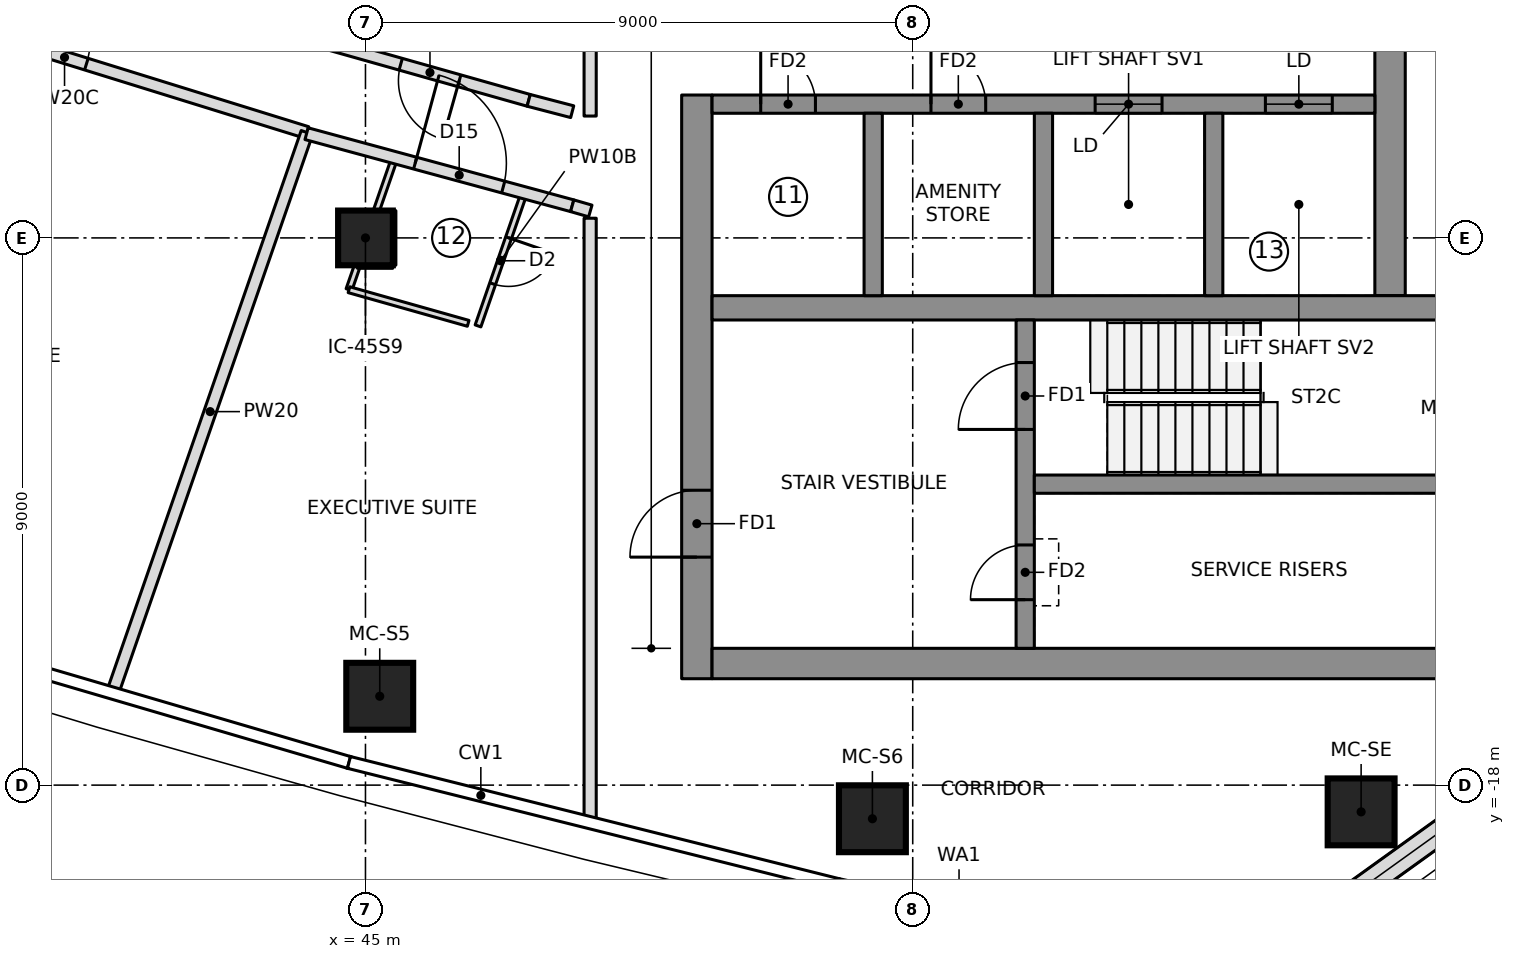
"""IFC4 building model, lengths in metres.
Left out: names, types, materials, properties, quantities, classifications, styles, units other than length and angle.
Written with IfcOpenShell. Run it as: python <this file> out.ifc"""

import sys

from ifc_helpers import new_model, si_unit, direction, frame, frame_2d, origin, origin_2d, place, context, subcontext, project, spatial, polyline, rectangle, outline, extrude, element, fill, save


model = new_model("IFC4")
c1 = context("Model", 3, precision=1e-05, world=origin(), true_north=direction((0.0, 1.0)))
c2 = subcontext(c1, "Body", "Model", "MODEL_VIEW")
j1 = project(units=[si_unit("LENGTHUNIT", "METRE"), si_unit("PLANEANGLEUNIT", "RADIAN")], contexts=[c1])
p1 = place(None, origin())
s1 = spatial("IfcSite", under=j1, at=p1, CompositionType="ELEMENT")
p2 = place(p1, origin())
s2 = spatial("IfcBuilding", under=s1, at=p2, CompositionType="ELEMENT")
p3 = place(p2, frame((0.0, 0.0, 292.75)))
s3 = spatial("IfcBuildingStorey", under=s2, at=p3, CompositionType="ELEMENT", Elevation=292.75)
p4 = place(p3, frame((50.45, -16.25, 0.0), z_axis=(0.0, 0.0, 1.0), x_axis=(0.0, 1.0, 0.0)))
e1 = element("IfcWall", 1, at=p4, inside=s3, PredefinedType="SHEAR", context=c2, shape_type="SweptSolid", body=[
    extrude(rectangle(XDim=9.6, YDim=0.5, at=frame_2d((4.8, 0.0))), origin(), (0.0, 0.0, 1.0), 3.55),
])
p5 = place(p4, frame((2.0, 0.0, 0.0)))
e2 = element("IfcOpeningElement", 2, at=p5, cuts=e1, PredefinedType="OPENING", context=c2, shape_type="SweptSolid", body=[
    extrude(rectangle(XDim=1.1, YDim=2.1, at=frame_2d((0.55, 1.05))), frame((0.0, 0.26, 0.0), z_axis=(0.0, -1.0, 0.0), x_axis=(1.0, 0.0, 0.0)), (0.0, 0.0, 1.0), 0.52),
])
p6 = place(p3, frame((50.7, -16.0, 0.0), z_axis=(0.0, 0.0, 1.0), x_axis=(1.0, 0.0, 0.0)))
e3 = element("IfcWall", 3, at=p6, inside=s3, PredefinedType="SHEAR", context=c2, shape_type="SweptSolid", body=[
    extrude(rectangle(XDim=13.52, YDim=0.5, at=frame_2d((6.76, 0.0))), origin(), (0.0, 0.0, 1.0), 3.55),
])
p7 = place(p3, frame((61.85, -9.95, 0.0), z_axis=(0.0, 0.0, 1.0), x_axis=(0.0, 1.0, 0.0)))
e4 = element("IfcWall", 4, at=p7, inside=s3, PredefinedType="SHEAR", context=c2, shape_type="SweptSolid", body=[
    extrude(rectangle(XDim=19.9, YDim=0.5, at=frame_2d((9.95, 0.0))), origin(), (0.0, 0.0, 1.0), 3.55),
])
p8 = place(p3, frame((50.7, -10.15, 0.0), z_axis=(0.0, 0.0, 1.0), x_axis=(1.0, 0.0, 0.0)))
e5 = element("IfcWall", 5, at=p8, inside=s3, PredefinedType="SHEAR", context=c2, shape_type="SweptSolid", body=[
    extrude(rectangle(XDim=13.02, YDim=0.4, at=frame_2d((6.51, 0.0))), origin(), (0.0, 0.0, 1.0), 3.55),
])
p9 = place(p3, frame((50.7, -6.8, 0.0), z_axis=(0.0, 0.0, 1.0), x_axis=(1.0, 0.0, 0.0)))
e6 = element("IfcWall", 6, at=p9, inside=s3, PredefinedType="SHEAR", context=c2, shape_type="SweptSolid", body=[
    extrude(rectangle(XDim=10.9, YDim=0.3, at=frame_2d((5.45, 0.0))), origin(), (0.0, 0.0, 1.0), 3.55),
])
p10 = place(p9, frame((6.3, 0.0, 0.0)))
e7 = element("IfcOpeningElement", 7, at=p10, cuts=e6, PredefinedType="OPENING", context=c2, shape_type="SweptSolid", body=[
    extrude(rectangle(XDim=1.1, YDim=2.1, at=frame_2d((0.55, 1.05))), frame((0.0, 0.16, 0.0), z_axis=(0.0, -1.0, 0.0), x_axis=(1.0, 0.0, 0.0)), (0.0, 0.0, 1.0), 0.32),
])
p11 = place(p9, frame((9.1, 0.0, 0.0)))
e8 = element("IfcOpeningElement", 8, at=p11, cuts=e6, PredefinedType="OPENING", context=c2, shape_type="SweptSolid", body=[
    extrude(rectangle(XDim=1.1, YDim=2.1, at=frame_2d((0.55, 1.05))), frame((0.0, 0.16, 0.0), z_axis=(0.0, -1.0, 0.0), x_axis=(1.0, 0.0, 0.0)), (0.0, 0.0, 1.0), 0.32),
])
p12 = place(p9, frame((0.8, 0.0, 0.0)))
e9 = element("IfcOpeningElement", 9, at=p12, cuts=e6, PredefinedType="OPENING", context=c2, shape_type="SweptSolid", body=[
    extrude(rectangle(XDim=0.9, YDim=2.1, at=frame_2d((0.45, 1.05))), frame((0.0, 0.16, 0.0), z_axis=(0.0, -1.0, 0.0), x_axis=(1.0, 0.0, 0.0)), (0.0, 0.0, 1.0), 0.32),
])
p13 = place(p9, frame((3.6, 0.0, 0.0)))
e10 = element("IfcOpeningElement", 10, at=p13, cuts=e6, PredefinedType="OPENING", context=c2, shape_type="SweptSolid", body=[
    extrude(rectangle(XDim=0.9, YDim=2.1, at=frame_2d((0.45, 1.05))), frame((0.0, 0.16, 0.0), z_axis=(0.0, -1.0, 0.0), x_axis=(1.0, 0.0, 0.0)), (0.0, 0.0, 1.0), 0.32),
])
for number, where, z_axis, x_axis in (
    (11, (53.35, -9.95, 0.0), (0.0, 0.0, 1.0), (0.0, 1.0, 0.0)),
    (12, (56.15, -9.95, 0.0), (0.0, 0.0, 1.0), (0.0, 1.0, 0.0)),
    (13, (58.95, -9.95, 0.0), (0.0, 0.0, 1.0), (0.0, 1.0, 0.0)),
):
    element("IfcWall", number, at=place(p3, frame(where, z_axis=z_axis, x_axis=x_axis)), inside=s3, PredefinedType="SHEAR", context=c2, shape_type="SweptSolid", body=[
        extrude(rectangle(XDim=3.0, YDim=0.3, at=frame_2d((1.5, 0.0))), origin(), (0.0, 0.0, 1.0), 3.55),
    ])
p14 = place(p3, frame((55.85, -15.75, 0.0), z_axis=(0.0, 0.0, 1.0), x_axis=(0.0, 1.0, 0.0)))
e14 = element("IfcWall", 14, at=p14, inside=s3, PredefinedType="SHEAR", context=c2, shape_type="SweptSolid", body=[
    extrude(rectangle(XDim=5.4, YDim=0.3, at=frame_2d((2.7, 0.0))), origin(), (0.0, 0.0, 1.0), 3.55),
])
p15 = place(p14, frame((3.6, 0.0, 0.0)))
e15 = element("IfcOpeningElement", 15, at=p15, cuts=e14, PredefinedType="OPENING", context=c2, shape_type="SweptSolid", body=[
    extrude(rectangle(XDim=1.1, YDim=2.1, at=frame_2d((0.55, 1.05))), frame((0.0, 0.16, 0.0), z_axis=(0.0, -1.0, 0.0), x_axis=(1.0, 0.0, 0.0)), (0.0, 0.0, 1.0), 0.32),
])
p16 = place(p14, frame((0.8, 0.0, 0.0)))
e16 = element("IfcOpeningElement", 16, at=p16, cuts=e14, PredefinedType="OPENING", context=c2, shape_type="SweptSolid", body=[
    extrude(rectangle(XDim=0.9, YDim=2.1, at=frame_2d((0.45, 1.05))), frame((0.0, 0.16, 0.0), z_axis=(0.0, -1.0, 0.0), x_axis=(1.0, 0.0, 0.0)), (0.0, 0.0, 1.0), 0.32),
])
p17 = place(p3, frame((56.0, -13.05, 0.0), z_axis=(0.0, 0.0, 1.0), x_axis=(1.0, 0.0, 0.0)))
e17 = element("IfcWall", 17, at=p17, inside=s3, PredefinedType="SHEAR", context=c2, shape_type="SweptSolid", body=[
    extrude(rectangle(XDim=7.72, YDim=0.3, at=frame_2d((3.86, 0.0))), origin(), (0.0, 0.0, 1.0), 3.55),
])
for number, where, z_axis, x_axis in (
    (18, (45.235, -16.539, 0.0), (0.0, 0.0, 1.0), (1.0, 0.0, 0.0)),
    (19, (53.337, -18.553, 0.0), (0.0, 0.0, 1.0), (1.0, 0.0, 0.0)),
    (20, (61.374, -18.44, 0.0), (0.0, 0.0, 1.0), (1.0, 0.0, 0.0)),
):
    element("IfcColumn", number, at=place(p3, frame(where, z_axis=z_axis, x_axis=x_axis)), inside=s3, PredefinedType="COLUMN", context=c2, shape_type="SweptSolid", body=[
        extrude(rectangle(XDim=1.1, YDim=1.1, at=origin_2d()), origin(), (0.0, 0.0, 1.0), 3.55),
    ])
p18 = place(p3, frame((45.0, -9.0, 0.0), z_axis=(0.0, 0.0, 1.0), x_axis=(1.0, 0.0, 0.0)))
e21 = element("IfcColumn", 21, at=p18, inside=s3, PredefinedType="COLUMN", context=c2, shape_type="SweptSolid", body=[
    extrude(rectangle(XDim=0.9, YDim=0.9, at=origin_2d()), origin(), (0.0, 0.0, 1.0), 3.55),
])
p19 = place(p3, frame((52.738, -19.732, 0.0), z_axis=(0.0, 0.0, 1.0), x_axis=(0.977020225348, -0.213146614471, 0.0)))
e22 = element("IfcWall", 22, at=p19, inside=s3, PredefinedType="NOTDEFINED", context=c2, shape_type="SweptSolid", body=[
    extrude(outline(polyline([(0.0, -0.2), (4.171, -0.2), (4.113, 0.2), (0.0, 0.2), (0.0, -0.2)])), origin(), (0.0, 0.0, 1.0), 3.25),
])
p20 = place(p19, frame((0.871, 0.0, 0.5)))
e23 = element("IfcOpeningElement", 23, at=p20, cuts=e22, PredefinedType="OPENING", context=c2, shape_type="SweptSolid", body=[
    extrude(rectangle(XDim=2.4, YDim=2.0, at=frame_2d((1.2, 1.0))), frame((0.0, 0.21, 0.0), z_axis=(0.0, -1.0, 0.0), x_axis=(1.0, 0.0, 0.0)), (0.0, 0.0, 1.0), 0.42),
])
p21 = place(p3, frame((60.472, -20.352, 0.0), z_axis=(0.0, 0.0, 1.0), x_axis=(0.811962548682, 0.583709533533, 0.0)))
e24 = element("IfcWall", 24, at=p21, inside=s3, PredefinedType="NOTDEFINED", context=c2, shape_type="SweptSolid", body=[
    extrude(outline(polyline([(-0.057, -0.2), (3.753, -0.2), (3.64, 0.2), (0.057, 0.2), (-0.057, -0.2)])), origin(), (0.0, 0.0, 1.0), 3.25),
])
p22 = place(p21, frame((0.748, 0.0, 0.6)))
e25 = element("IfcOpeningElement", 25, at=p22, cuts=e24, PredefinedType="OPENING", context=c2, shape_type="SweptSolid", body=[
    extrude(outline(polyline([(0.0, 1.35), (0.084, 1.771), (0.322, 2.128), (0.679, 2.366), (1.1, 2.45), (1.521, 2.366), (1.878, 2.128), (2.116, 1.771), (2.2, 1.35), (2.2, 1.1), (2.116, 0.679), (1.878, 0.322), (1.521, 0.084), (1.1, 0.0), (0.679, 0.084), (0.322, 0.322), (0.084, 0.679), (0.0, 1.1), (0.0, 1.35)])), frame((0.0, 0.21, 0.0), z_axis=(0.0, -1.0, 0.0), x_axis=(1.0, 0.0, 0.0)), (0.0, 0.0, 1.0), 0.42),
])
p23 = place(p3, frame((36.064, -4.794, 0.0), z_axis=(0.0, 0.0, 1.0), x_axis=(0.955129200503, -0.296189483855, 0.0)))
e26 = element("IfcWall", 26, at=p23, inside=s3, PredefinedType="PARTITIONING", context=c2, shape_type="SweptSolid", body=[
    extrude(rectangle(XDim=8.348, YDim=0.2, at=frame_2d((4.174, 0.0))), origin(), (0.0, 0.0, 1.0), 3.25),
])
p24 = place(p23, frame((3.05, 0.0, 0.0)))
e27 = element("IfcOpeningElement", 27, at=p24, cuts=e26, PredefinedType="OPENING", context=c2, shape_type="SweptSolid", body=[
    extrude(rectangle(XDim=1.5, YDim=2.1, at=frame_2d((0.75, 1.05))), frame((0.0, 0.11, 0.0), z_axis=(0.0, -1.0, 0.0), x_axis=(1.0, 0.0, 0.0)), (0.0, 0.0, 1.0), 0.22),
])
p25 = place(p3, frame((40.854, -16.447, 0.0), z_axis=(0.0, 0.0, 1.0), x_axis=(0.327714576096, 0.944776776077, 0.0)))
e28 = element("IfcWall", 28, at=p25, inside=s3, PredefinedType="PARTITIONING", context=c2, shape_type="SweptSolid", body=[
    extrude(rectangle(XDim=9.717, YDim=0.2, at=frame_2d((4.858, 0.0))), origin(), (0.0, 0.0, 1.0), 3.25),
])
p26 = place(p3, frame((44.729, -9.852, 0.0), z_axis=(0.0, 0.0, 1.0), x_axis=(0.327741335839, 0.944767493504, 0.0)))
e29 = element("IfcWall", 29, at=p26, inside=s3, PredefinedType="PARTITIONING", context=c2, shape_type="SweptSolid", body=[
    extrude(rectangle(XDim=0.425, YDim=0.1, at=frame_2d((0.213, 0.0))), origin(), (0.0, 0.0, 1.0), 3.25),
])
p27 = place(p3, frame((44.868, -9.45, 0.0), z_axis=(0.0, 0.0, 1.0), x_axis=(1.0, 0.0, 0.0)))
e30 = element("IfcWall", 30, at=p27, inside=s3, PredefinedType="PARTITIONING", context=c2, shape_type="SweptSolid", body=[
    extrude(rectangle(XDim=0.58, YDim=0.1, at=frame_2d((0.29, 0.0))), origin(), (0.0, 0.0, 1.0), 3.25),
])
p28 = place(p3, frame((45.45, -9.448, 0.0), z_axis=(0.0, 0.0, 1.0), x_axis=(0.0, 1.0, 0.0)))
e31 = element("IfcWall", 31, at=p28, inside=s3, PredefinedType="PARTITIONING", context=c2, shape_type="SweptSolid", body=[
    extrude(rectangle(XDim=0.896, YDim=0.1, at=frame_2d((0.448, 0.0))), origin(), (0.0, 0.0, 1.0), 3.25),
])
p29 = place(p3, frame((45.18, -8.55, 0.0), z_axis=(0.0, 0.0, 1.0), x_axis=(0.327723446833, 0.944773699039, 0.0)))
e32 = element("IfcWall", 32, at=p29, inside=s3, PredefinedType="PARTITIONING", context=c2, shape_type="SweptSolid", body=[
    extrude(rectangle(XDim=0.903, YDim=0.1, at=frame_2d((0.451, 0.0))), origin(), (0.0, 0.0, 1.0), 3.25),
])
p30 = place(p3, frame((47.599, -8.289, 0.0), z_axis=(0.0, 0.0, 1.0), x_axis=(-0.327716238033, -0.944776199599, 0.0)))
e33 = element("IfcWall", 33, at=p30, inside=s3, PredefinedType="PARTITIONING", context=c2, shape_type="SweptSolid", body=[
    extrude(rectangle(XDim=2.284, YDim=0.1, at=frame_2d((1.142, 0.0))), origin(), (0.0, 0.0, 1.0), 3.25),
])
p31 = place(p30, frame((0.75, 0.0, 0.0)))
e34 = element("IfcOpeningElement", 34, at=p31, cuts=e33, PredefinedType="OPENING", context=c2, shape_type="SweptSolid", body=[
    extrude(rectangle(XDim=0.8, YDim=2.1, at=frame_2d((0.4, 1.05))), frame((0.0, 0.06, 0.0), z_axis=(0.0, -1.0, 0.0), x_axis=(1.0, 0.0, 0.0)), (0.0, 0.0, 1.0), 0.12),
])
p32 = place(p3, frame((46.689, -10.405, 0.0), z_axis=(0.0, 0.0, 1.0), x_axis=(-0.962405498185, 0.271616746654, 0.0)))
e35 = element("IfcWall", 35, at=p32, inside=s3, PredefinedType="PARTITIONING", context=c2, shape_type="SweptSolid", body=[
    extrude(rectangle(XDim=2.037, YDim=0.1, at=frame_2d((1.019, 0.0))), origin(), (0.0, 0.0, 1.0), 3.25),
])
p33 = place(p3, frame((47.684, -6.738, 0.0), z_axis=(0.0, 0.0, 1.0), x_axis=(-0.962403613575, 0.271623424206, 0.0)))
e36 = element("IfcWall", 36, at=p33, inside=s3, PredefinedType="PARTITIONING", context=c2, shape_type="SweptSolid", body=[
    extrude(rectangle(XDim=3.374, YDim=0.2, at=frame_2d((1.687, 0.0))), origin(), (0.0, 0.0, 1.0), 3.25),
])
p34 = place(p33, frame((1.187, 0.0, 0.0)))
e37 = element("IfcOpeningElement", 37, at=p34, cuts=e36, PredefinedType="OPENING", context=c2, shape_type="SweptSolid", body=[
    extrude(rectangle(XDim=1.0, YDim=2.1, at=frame_2d((0.5, 1.05))), frame((0.0, 0.11, 0.0), z_axis=(0.0, -1.0, 0.0), x_axis=(1.0, 0.0, 0.0)), (0.0, 0.0, 1.0), 0.22),
])
p35 = place(p3, frame((44.031, -7.286, 0.0), z_axis=(0.0, 0.0, 1.0), x_axis=(0.965107760304, -0.261853033211, 0.0)))
e38 = element("IfcWall", 38, at=p35, inside=s3, PredefinedType="PARTITIONING", context=c2, shape_type="SweptSolid", body=[
    extrude(rectangle(XDim=4.527, YDim=0.2, at=frame_2d((2.263, 0.0))), origin(), (0.0, 0.0, 1.0), 3.25),
])
p36 = place(p35, frame((1.851, 0.0, 0.0)))
e39 = element("IfcOpeningElement", 39, at=p36, cuts=e38, PredefinedType="OPENING", context=c2, shape_type="SweptSolid", body=[
    extrude(rectangle(XDim=1.5, YDim=2.1, at=frame_2d((0.75, 1.05))), frame((0.0, 0.11, 0.0), z_axis=(0.0, -1.0, 0.0), x_axis=(1.0, 0.0, 0.0)), (0.0, 0.0, 1.0), 0.22),
])
p37 = place(p3, frame((48.4, -6.924, 0.0), z_axis=(0.0, 0.0, 1.0), x_axis=(-0.967585713416, 0.252542842294, 0.0)))
e40 = element("IfcWall", 40, at=p37, inside=s3, PredefinedType="PARTITIONING", context=c2, shape_type="SweptSolid", body=[
    extrude(rectangle(XDim=0.74, YDim=0.2, at=frame_2d((0.37, 0.0))), origin(), (0.0, 0.0, 1.0), 3.25),
])
p38 = place(p3, frame((48.695, 6.996, 0.0), z_axis=(0.0, 0.0, 1.0), x_axis=(0.0, -1.0, 0.0)))
e41 = element("IfcWall", 41, at=p38, inside=s3, PredefinedType="PARTITIONING", context=c2, shape_type="SweptSolid", body=[
    extrude(rectangle(XDim=13.992, YDim=0.2, at=frame_2d((6.996, 0.0))), origin(), (0.0, 0.0, 1.0), 3.25),
])
p39 = place(p3, frame((48.4, -8.471, 0.0), z_axis=(0.0, 0.0, 1.0), x_axis=(0.960807456803, -0.277216577701, 0.0)))
e42 = element("IfcWall", 42, at=p39, inside=s3, PredefinedType="PARTITIONING", context=c2, shape_type="SweptSolid", body=[
    extrude(rectangle(XDim=0.31, YDim=0.2, at=frame_2d((0.155, 0.0))), origin(), (0.0, 0.0, 1.0), 3.25),
])
p40 = place(p3, frame((48.695, -8.676, 0.0), z_axis=(0.0, 0.0, 1.0), x_axis=(0.0, -1.0, 0.0)))
e43 = element("IfcWall", 43, at=p40, inside=s3, PredefinedType="PARTITIONING", context=c2, shape_type="SweptSolid", body=[
    extrude(rectangle(XDim=9.877, YDim=0.2, at=frame_2d((4.938, 0.0))), origin(), (0.0, 0.0, 1.0), 3.25),
])
p41 = place(p22, origin())
e44 = element("IfcWindow", 44, at=p41, inside=s3, PartitioningType="SINGLE_PANEL", PredefinedType="WINDOW", context=c2, shape_type="SweptSolid", body=[
    extrude(outline(polyline([(0.0, 1.35), (0.084, 1.771), (0.322, 2.128), (0.679, 2.366), (1.1, 2.45), (1.521, 2.366), (1.878, 2.128), (2.116, 1.771), (2.2, 1.35), (2.2, 1.1), (2.116, 0.679), (1.878, 0.322), (1.521, 0.084), (1.1, 0.0), (0.679, 0.084), (0.322, 0.322), (0.084, 0.679), (0.0, 1.1), (0.0, 1.35)])), frame((0.0, 0.17, 0.0), z_axis=(0.0, -1.0, 0.0), x_axis=(1.0, 0.0, 0.0)), (0.0, 0.0, 1.0), 0.06),
])
fill(e25, e44)
p42 = place(p24, origin())
e45 = element("IfcDoor", 45, at=p42, inside=s3, OperationType="DOUBLE_DOOR_SINGLE_SWING", PredefinedType="DOOR", context=c2, shape_type="SweptSolid", body=[
    extrude(rectangle(XDim=1.5, YDim=2.1, at=frame_2d((0.75, 1.05))), frame((0.0, 0.025, 0.0), z_axis=(0.0, -1.0, 0.0), x_axis=(1.0, 0.0, 0.0)), (0.0, 0.0, 1.0), 0.05),
])
fill(e27, e45)
p43 = place(p31, origin())
e46 = element("IfcDoor", 46, at=p43, inside=s3, OperationType="SINGLE_SWING_LEFT", PredefinedType="DOOR", context=c2, shape_type="SweptSolid", body=[
    extrude(rectangle(XDim=0.8, YDim=2.1, at=frame_2d((0.4, 1.05))), frame((0.0, 0.025, 0.0), z_axis=(0.0, -1.0, 0.0), x_axis=(1.0, 0.0, 0.0)), (0.0, 0.0, 1.0), 0.05),
])
fill(e34, e46)
p44 = place(p36, origin())
e47 = element("IfcDoor", 47, at=p44, inside=s3, OperationType="DOUBLE_DOOR_SINGLE_SWING", PredefinedType="DOOR", context=c2, shape_type="SweptSolid", body=[
    extrude(rectangle(XDim=1.5, YDim=2.1, at=frame_2d((0.75, 1.05))), frame((0.0, 0.025, 0.0), z_axis=(0.0, -1.0, 0.0), x_axis=(1.0, 0.0, 0.0)), (0.0, 0.0, 1.0), 0.05),
])
fill(e39, e47)
p45 = place(p34, origin())
e48 = element("IfcDoor", 48, at=p45, inside=s3, OperationType="SINGLE_SWING_LEFT", PredefinedType="DOOR", context=c2, shape_type="SweptSolid", body=[
    extrude(rectangle(XDim=1.0, YDim=2.1, at=frame_2d((0.5, 1.05))), frame((0.0, 0.025, 0.0), z_axis=(0.0, -1.0, 0.0), x_axis=(1.0, 0.0, 0.0)), (0.0, 0.0, 1.0), 0.05),
])
fill(e37, e48)
p46 = place(p10, origin())
e49 = element("IfcDoor", 49, at=p46, inside=s3, OperationType="DOUBLE_DOOR_SLIDING", PredefinedType="DOOR", context=c2, shape_type="SweptSolid", body=[
    extrude(rectangle(XDim=1.1, YDim=2.1, at=frame_2d((0.55, 1.05))), frame((0.0, 0.025, 0.0), z_axis=(0.0, -1.0, 0.0), x_axis=(1.0, 0.0, 0.0)), (0.0, 0.0, 1.0), 0.05),
])
fill(e7, e49)
p47 = place(p11, origin())
e50 = element("IfcDoor", 50, at=p47, inside=s3, OperationType="DOUBLE_DOOR_SLIDING", PredefinedType="DOOR", context=c2, shape_type="SweptSolid", body=[
    extrude(rectangle(XDim=1.1, YDim=2.1, at=frame_2d((0.55, 1.05))), frame((0.0, 0.025, 0.0), z_axis=(0.0, -1.0, 0.0), x_axis=(1.0, 0.0, 0.0)), (0.0, 0.0, 1.0), 0.05),
])
fill(e8, e50)
p48 = place(p15, origin())
e51 = element("IfcDoor", 51, at=p48, inside=s3, OperationType="SINGLE_SWING_RIGHT", PredefinedType="DOOR", context=c2, shape_type="SweptSolid", body=[
    extrude(rectangle(XDim=1.1, YDim=2.1, at=frame_2d((0.55, 1.05))), frame((0.0, 0.025, 0.0), z_axis=(0.0, -1.0, 0.0), x_axis=(1.0, 0.0, 0.0)), (0.0, 0.0, 1.0), 0.05),
])
fill(e15, e51)
p49 = place(p5, origin())
e52 = element("IfcDoor", 52, at=p49, inside=s3, OperationType="SINGLE_SWING_RIGHT", PredefinedType="DOOR", context=c2, shape_type="SweptSolid", body=[
    extrude(rectangle(XDim=1.1, YDim=2.1, at=frame_2d((0.55, 1.05))), frame((0.0, 0.025, 0.0), z_axis=(0.0, -1.0, 0.0), x_axis=(1.0, 0.0, 0.0)), (0.0, 0.0, 1.0), 0.05),
])
fill(e2, e52)
p50 = place(p16, origin())
e53 = element("IfcDoor", 53, at=p50, inside=s3, OperationType="SINGLE_SWING_LEFT", PredefinedType="DOOR", context=c2, shape_type="SweptSolid", body=[
    extrude(rectangle(XDim=0.9, YDim=2.1, at=frame_2d((0.45, 1.05))), frame((0.0, 0.025, 0.0), z_axis=(0.0, -1.0, 0.0), x_axis=(1.0, 0.0, 0.0)), (0.0, 0.0, 1.0), 0.05),
])
fill(e16, e53)
p51 = place(p12, origin())
e54 = element("IfcDoor", 54, at=p51, inside=s3, OperationType="SINGLE_SWING_LEFT", PredefinedType="DOOR", context=c2, shape_type="SweptSolid", body=[
    extrude(rectangle(XDim=0.9, YDim=2.1, at=frame_2d((0.45, 1.05))), frame((0.0, 0.025, 0.0), z_axis=(0.0, -1.0, 0.0), x_axis=(1.0, 0.0, 0.0)), (0.0, 0.0, 1.0), 0.05),
])
fill(e9, e54)
p52 = place(p13, origin())
e55 = element("IfcDoor", 55, at=p52, inside=s3, OperationType="SINGLE_SWING_LEFT", PredefinedType="DOOR", context=c2, shape_type="SweptSolid", body=[
    extrude(rectangle(XDim=0.9, YDim=2.1, at=frame_2d((0.45, 1.05))), frame((0.0, 0.025, 0.0), z_axis=(0.0, -1.0, 0.0), x_axis=(1.0, 0.0, 0.0)), (0.0, 0.0, 1.0), 0.05),
])
fill(e10, e55)
save(model, sys.argv[1])
